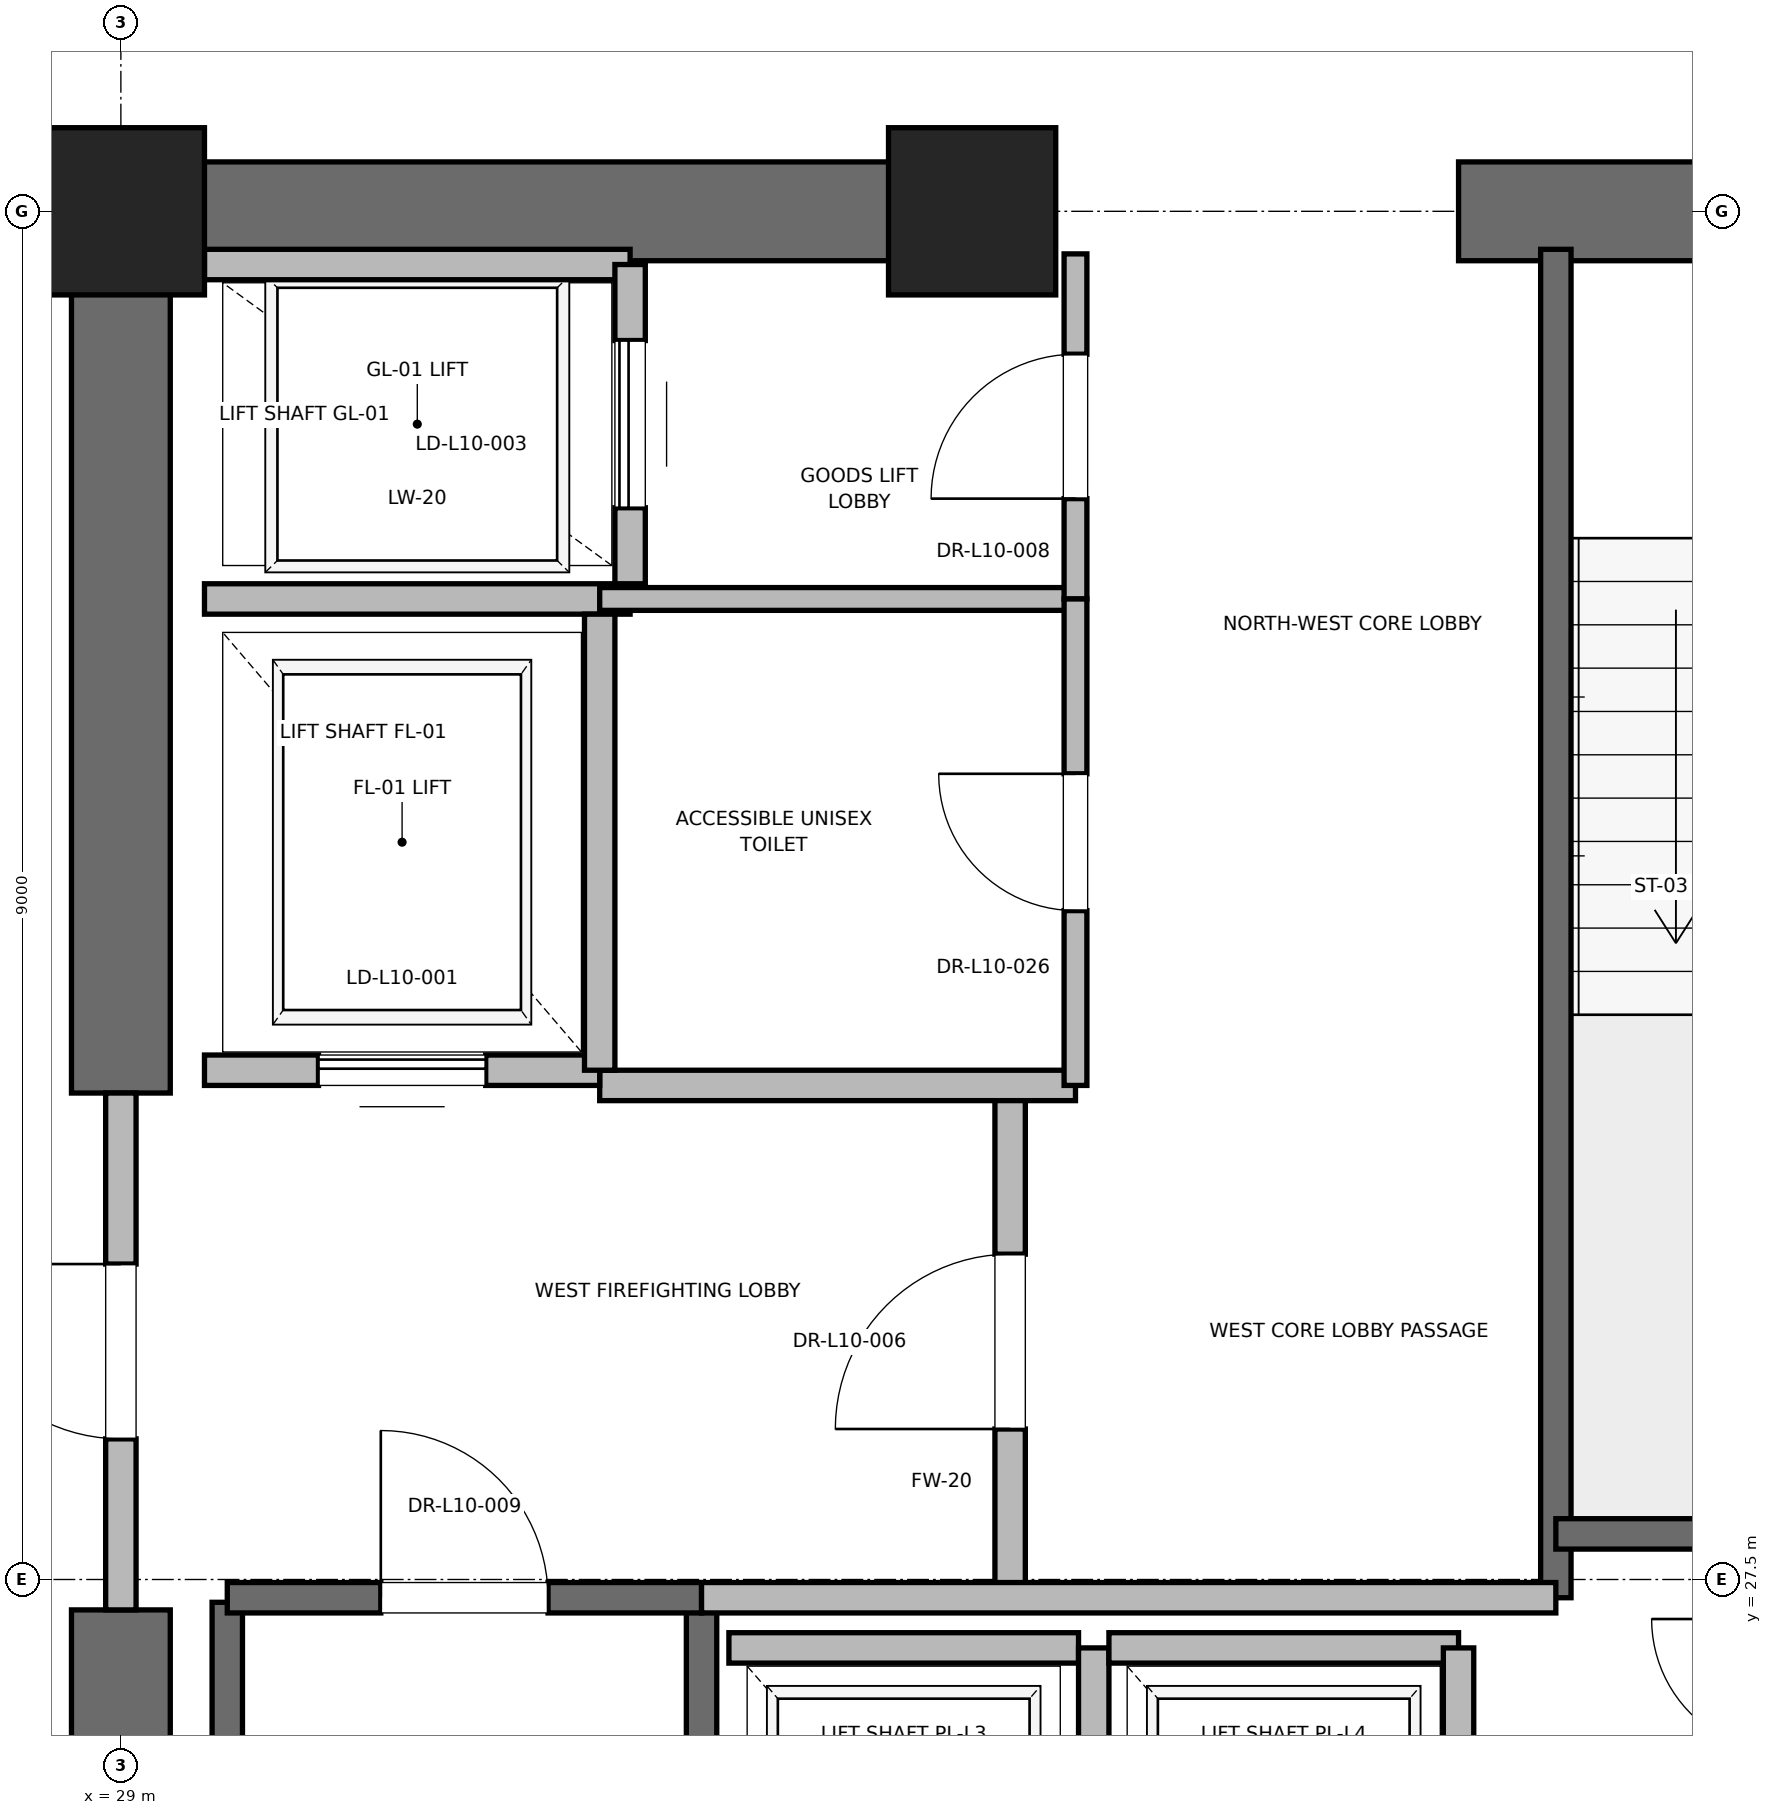
"""IFC4 building model, lengths in metres.
Left out: names, types, materials, properties, quantities, classifications, styles, units other than length and angle.
Written with IfcOpenShell. Run it as: python <this file> out.ifc"""

import sys

from ifc_helpers import new_model, si_unit, direction, frame, frame_2d, origin, origin_2d, place, context, subcontext, project, spatial, rectangle, extrude, element, fill, save


model = new_model("IFC4")
c1 = context("Model", 3, precision=1e-05, world=origin(), true_north=direction((0.0, 1.0)))
c2 = subcontext(c1, "Body", "Model", "MODEL_VIEW")
j1 = project(units=[si_unit("LENGTHUNIT", "METRE"), si_unit("PLANEANGLEUNIT", "RADIAN")], contexts=[c1])
p1 = place(None, origin())
s1 = spatial("IfcSite", under=j1, at=p1, CompositionType="ELEMENT")
p2 = place(p1, origin())
s2 = spatial("IfcBuilding", under=s1, at=p2, CompositionType="ELEMENT")
p3 = place(p2, frame((0.0, 0.0, 47.6)))
s3 = spatial("IfcBuildingStorey", under=s2, at=p3, CompositionType="ELEMENT", Elevation=47.6)
for number, where, z_axis, x_axis in (
    (1, (29.0, 36.5, 0.0), (0.0, 0.0, 1.0), (1.0, 0.0, 0.0)),
    (2, (34.6, 36.5, 0.0), (0.0, 0.0, 1.0), (1.0, 0.0, 0.0)),
):
    element("IfcColumn", number, at=place(p3, frame(where, z_axis=z_axis, x_axis=x_axis)), inside=s3, PredefinedType="PILASTER", context=c2, shape_type="SweptSolid", body=[
        extrude(rectangle(XDim=1.1, YDim=1.1, at=origin_2d()), origin(), (0.0, 0.0, 1.0), 4.0),
    ])
p4 = place(p3, frame((29.0, 36.5, 0.0), z_axis=(0.0, 0.0, 1.0), x_axis=(1.0, 0.0, 0.0)))
e3 = element("IfcWall", 3, at=p4, inside=s3, PredefinedType="SHEAR", context=c2, shape_type="SweptSolid", body=[
    extrude(rectangle(XDim=5.8, YDim=0.65, at=frame_2d((2.9, 0.0))), origin(), (0.0, 0.0, 1.0), 3.76),
])
p5 = place(p3, frame((37.8, 36.5, 0.0), z_axis=(0.0, 0.0, 1.0), x_axis=(1.0, 0.0, 0.0)))
e4 = element("IfcWall", 4, at=p5, inside=s3, PredefinedType="SHEAR", context=c2, shape_type="SweptSolid", body=[
    extrude(rectangle(XDim=4.4, YDim=0.65, at=frame_2d((2.2, 0.0))), origin(), (0.0, 0.0, 1.0), 3.76),
])
p6 = place(p5, frame((1.65, 0.0, 0.0)))
e5 = element("IfcOpeningElement", 5, at=p6, cuts=e4, PredefinedType="OPENING", context=c2, shape_type="SweptSolid", body=[
    extrude(rectangle(XDim=1.1, YDim=2.15, at=frame_2d((0.55, 1.075))), frame((0.0, 0.325, 0.0), z_axis=(0.0, -1.0, 0.0), x_axis=(1.0, 0.0, 0.0)), (0.0, 0.0, 1.0), 0.65),
])
p7 = place(p3, frame((29.0, 18.5, 0.0), z_axis=(0.0, 0.0, 1.0), x_axis=(0.0, 1.0, 0.0)))
e6 = element("IfcWall", 6, at=p7, inside=s3, PredefinedType="SHEAR", context=c2, shape_type="SweptSolid", body=[
    extrude(rectangle(XDim=8.8, YDim=0.65, at=frame_2d((4.4, 0.0))), origin(), (0.0, 0.0, 1.0), 3.76),
])
p8 = place(p3, frame((29.0, 30.7, 0.0), z_axis=(0.0, 0.0, 1.0), x_axis=(0.0, 1.0, 0.0)))
e7 = element("IfcWall", 7, at=p8, inside=s3, PredefinedType="SHEAR", context=c2, shape_type="SweptSolid", body=[
    extrude(rectangle(XDim=5.8, YDim=0.65, at=frame_2d((2.9, 0.0))), origin(), (0.0, 0.0, 1.0), 3.76),
])
p9 = place(p3, frame((29.7, 19.2, 0.0), z_axis=(0.0, 0.0, 1.0), x_axis=(0.0, 1.0, 0.0)))
e8 = element("IfcWall", 8, at=p9, inside=s3, PredefinedType="SOLIDWALL", context=c2, shape_type="SweptSolid", body=[
    extrude(rectangle(XDim=8.15, YDim=0.2, at=frame_2d((4.075, 0.0))), origin(), (0.0, 0.0, 1.0), 3.76),
])
p10 = place(p3, frame((32.82, 18.6, 0.0), z_axis=(0.0, 0.0, 1.0), x_axis=(0.0, 1.0, 0.0)))
e9 = element("IfcWall", 9, at=p10, inside=s3, PredefinedType="SOLIDWALL", context=c2, shape_type="SweptSolid", body=[
    extrude(rectangle(XDim=8.78, YDim=0.2, at=frame_2d((4.39, 0.0))), origin(), (0.0, 0.0, 1.0), 3.76),
])
p11 = place(p3, frame((29.7, 27.38, 0.0), z_axis=(0.0, 0.0, 1.0), x_axis=(1.0, 0.0, 0.0)))
e10 = element("IfcWall", 10, at=p11, inside=s3, PredefinedType="SOLIDWALL", context=c2, shape_type="SweptSolid", body=[
    extrude(rectangle(XDim=3.12, YDim=0.2, at=frame_2d((1.56, 0.0))), origin(), (0.0, 0.0, 1.0), 3.76),
])
p12 = place(p11, frame((1.01, 0.0, 0.0)))
e11 = element("IfcOpeningElement", 11, at=p12, cuts=e10, PredefinedType="OPENING", context=c2, shape_type="SweptSolid", body=[
    extrude(rectangle(XDim=1.1, YDim=2.15, at=frame_2d((0.55, 1.075))), frame((0.0, 0.1, 0.0), z_axis=(0.0, -1.0, 0.0), x_axis=(1.0, 0.0, 0.0)), (0.0, 0.0, 1.0), 0.2),
])
p13 = place(p3, frame((38.44, 27.38, 0.0), z_axis=(0.0, 0.0, 1.0), x_axis=(0.0, 1.0, 0.0)))
e12 = element("IfcWall", 12, at=p13, inside=s3, PredefinedType="SOLIDWALL", context=c2, shape_type="SweptSolid", body=[
    extrude(rectangle(XDim=8.87, YDim=0.2, at=frame_2d((4.435, 0.0))), origin(), (0.0, 0.0, 1.0), 3.76),
])
p14 = place(p3, frame((38.44, 27.8, 0.0), z_axis=(0.0, 0.0, 1.0), x_axis=(1.0, 0.0, 0.0)))
e13 = element("IfcWall", 13, at=p14, inside=s3, PredefinedType="SOLIDWALL", context=c2, shape_type="SweptSolid", body=[
    extrude(rectangle(XDim=3.32, YDim=0.2, at=frame_2d((1.66, 0.0))), origin(), (0.0, 0.0, 1.0), 3.76),
])
p15 = place(p3, frame((34.85, 27.38, 0.0), z_axis=(0.0, 0.0, 1.0), x_axis=(0.0, 1.0, 0.0)))
e14 = element("IfcWall", 14, at=p15, inside=s3, PredefinedType="PARTITIONING", context=c2, shape_type="SweptSolid", body=[
    extrude(rectangle(XDim=3.37, YDim=0.2, at=frame_2d((1.685, 0.0))), origin(), (0.0, 0.0, 1.0), 3.76),
])
p16 = place(p15, frame((1.11, 0.0, 0.0)))
e15 = element("IfcOpeningElement", 15, at=p16, cuts=e14, PredefinedType="OPENING", context=c2, shape_type="SweptSolid", body=[
    extrude(rectangle(XDim=1.15, YDim=2.2, at=frame_2d((0.575, 1.1))), frame((0.0, 0.1, 0.0), z_axis=(0.0, -1.0, 0.0), x_axis=(1.0, 0.0, 0.0)), (0.0, 0.0, 1.0), 0.2),
])
p17 = place(p3, frame((29.0, 27.3, 0.0), z_axis=(0.0, 0.0, 1.0), x_axis=(0.0, 1.0, 0.0)))
e16 = element("IfcWall", 16, at=p17, inside=s3, PredefinedType="PARTITIONING", context=c2, shape_type="SweptSolid", body=[
    extrude(rectangle(XDim=3.4, YDim=0.2, at=frame_2d((1.7, 0.0))), origin(), (0.0, 0.0, 1.0), 2.54),
])
p18 = place(p17, frame((1.125, 0.0, 0.0)))
e17 = element("IfcOpeningElement", 17, at=p18, cuts=e16, PredefinedType="OPENING", context=c2, shape_type="SweptSolid", body=[
    extrude(rectangle(XDim=1.15, YDim=2.2, at=frame_2d((0.575, 1.1))), frame((0.0, 0.1, 0.0), z_axis=(0.0, -1.0, 0.0), x_axis=(1.0, 0.0, 0.0)), (0.0, 0.0, 1.0), 0.2),
])
p19 = place(p3, frame((32.82, 27.38, 0.0), z_axis=(0.0, 0.0, 1.0), x_axis=(1.0, 0.0, 0.0)))
e18 = element("IfcWall", 18, at=p19, inside=s3, PredefinedType="PARTITIONING", context=c2, shape_type="SweptSolid", body=[
    extrude(rectangle(XDim=5.62, YDim=0.2, at=frame_2d((2.81, 0.0))), origin(), (0.0, 0.0, 1.0), 3.76),
])
p20 = place(p3, frame((32.15, 30.75, 0.0), z_axis=(0.0, 0.0, 1.0), x_axis=(1.0, 0.0, 0.0)))
e19 = element("IfcWall", 19, at=p20, inside=s3, PredefinedType="PARTITIONING", context=c2, shape_type="SweptSolid", body=[
    extrude(rectangle(XDim=3.13, YDim=0.2, at=frame_2d((1.565, 0.0))), origin(), (0.0, 0.0, 1.0), 3.76),
])
p21 = place(p3, frame((29.55, 30.85, 0.0), z_axis=(0.0, 0.0, 1.0), x_axis=(1.0, 0.0, 0.0)))
e20 = element("IfcWall", 20, at=p21, inside=s3, PredefinedType="SOLIDWALL", context=c2, shape_type="SweptSolid", body=[
    extrude(rectangle(XDim=2.6, YDim=0.2, at=frame_2d((1.3, 0.0))), origin(), (0.0, 0.0, 1.0), 2.54),
])
p22 = place(p21, frame((0.75, 0.0, 0.0)))
e21 = element("IfcOpeningElement", 21, at=p22, cuts=e20, PredefinedType="OPENING", context=c2, shape_type="SweptSolid", body=[
    extrude(rectangle(XDim=1.1, YDim=2.2, at=frame_2d((0.55, 1.1))), frame((0.0, 0.1, 0.0), z_axis=(0.0, -1.0, 0.0), x_axis=(1.0, 0.0, 0.0)), (0.0, 0.0, 1.0), 0.2),
])
p23 = place(p3, frame((29.55, 33.95, 0.0), z_axis=(0.0, 0.0, 1.0), x_axis=(1.0, 0.0, 0.0)))
e22 = element("IfcWall", 22, at=p23, inside=s3, PredefinedType="SOLIDWALL", context=c2, shape_type="SweptSolid", body=[
    extrude(rectangle(XDim=2.8, YDim=0.2, at=frame_2d((1.4, 0.0))), origin(), (0.0, 0.0, 1.0), 3.76),
])
p24 = place(p3, frame((32.15, 30.85, 0.0), z_axis=(0.0, 0.0, 1.0), x_axis=(0.0, 1.0, 0.0)))
e23 = element("IfcWall", 23, at=p24, inside=s3, PredefinedType="SOLIDWALL", context=c2, shape_type="SweptSolid", body=[
    extrude(rectangle(XDim=3.0, YDim=0.2, at=frame_2d((1.5, 0.0))), origin(), (0.0, 0.0, 1.0), 3.76),
])
p25 = place(p3, frame((32.35, 36.15, 0.0), z_axis=(0.0, 0.0, 1.0), x_axis=(-1.0, 0.0, 0.0)))
e24 = element("IfcWall", 24, at=p25, inside=s3, PredefinedType="SOLIDWALL", context=c2, shape_type="SweptSolid", body=[
    extrude(rectangle(XDim=2.8, YDim=0.2, at=frame_2d((1.4, 0.0))), origin(), (0.0, 0.0, 1.0), 2.889),
])
p26 = place(p3, frame((32.35, 34.05, 0.0), z_axis=(0.0, 0.0, 1.0), x_axis=(0.0, 1.0, 0.0)))
e25 = element("IfcWall", 25, at=p26, inside=s3, PredefinedType="SOLIDWALL", context=c2, shape_type="SweptSolid", body=[
    extrude(rectangle(XDim=2.1, YDim=0.2, at=frame_2d((1.05, 0.0))), origin(), (0.0, 0.0, 1.0), 3.76),
])
p27 = place(p26, frame((0.5, 0.0, 0.0)))
e26 = element("IfcOpeningElement", 26, at=p27, cuts=e25, PredefinedType="OPENING", context=c2, shape_type="SweptSolid", body=[
    extrude(rectangle(XDim=1.1, YDim=2.2, at=frame_2d((0.55, 1.1))), frame((0.0, 0.1, 0.0), z_axis=(0.0, -1.0, 0.0), x_axis=(1.0, 0.0, 0.0)), (0.0, 0.0, 1.0), 0.2),
])
p28 = place(p3, frame((35.3, 27.05, 0.0), z_axis=(0.0, 0.0, 1.0), x_axis=(-1.0, 0.0, 0.0)))
e27 = element("IfcWall", 27, at=p28, inside=s3, PredefinedType="SOLIDWALL", context=c2, shape_type="SweptSolid", body=[
    extrude(rectangle(XDim=2.3, YDim=0.2, at=frame_2d((1.15, 0.0))), origin(), (0.0, 0.0, 1.0), 3.76),
])
p29 = place(p3, frame((35.4, 24.45, 0.0), z_axis=(0.0, 0.0, 1.0), x_axis=(0.0, 1.0, 0.0)))
e28 = element("IfcWall", 28, at=p29, inside=s3, PredefinedType="SOLIDWALL", context=c2, shape_type="SweptSolid", body=[
    extrude(rectangle(XDim=2.6, YDim=0.2, at=frame_2d((1.3, 0.0))), origin(), (0.0, 0.0, 1.0), 3.76),
])
p30 = place(p3, frame((37.8, 27.05, 0.0), z_axis=(0.0, 0.0, 1.0), x_axis=(-1.0, 0.0, 0.0)))
e29 = element("IfcWall", 29, at=p30, inside=s3, PredefinedType="SOLIDWALL", context=c2, shape_type="SweptSolid", body=[
    extrude(rectangle(XDim=2.3, YDim=0.2, at=frame_2d((1.15, 0.0))), origin(), (0.0, 0.0, 1.0), 3.76),
])
p31 = place(p3, frame((37.8, 24.45, 0.0), z_axis=(0.0, 0.0, 1.0), x_axis=(0.0, 1.0, 0.0)))
e30 = element("IfcWall", 30, at=p31, inside=s3, PredefinedType="SOLIDWALL", context=c2, shape_type="SweptSolid", body=[
    extrude(rectangle(XDim=2.6, YDim=0.2, at=frame_2d((1.3, 0.0))), origin(), (0.0, 0.0, 1.0), 3.76),
])
p32 = place(p3, frame((32.15, 33.95, 0.0), z_axis=(0.0, 0.0, 1.0), x_axis=(1.0, 0.0, 0.0)))
e31 = element("IfcWall", 31, at=p32, inside=s3, PredefinedType="PARTITIONING", context=c2, shape_type="SweptSolid", body=[
    extrude(rectangle(XDim=3.13, YDim=0.15, at=frame_2d((1.565, 0.0))), origin(), (0.0, 0.0, 1.0), 2.85),
])
p33 = place(p3, frame((35.28, 33.95, 0.0), z_axis=(0.0, 0.0, 1.0), x_axis=(0.0, 1.0, 0.0)))
e32 = element("IfcWall", 32, at=p33, inside=s3, PredefinedType="PARTITIONING", context=c2, shape_type="SweptSolid", body=[
    extrude(rectangle(XDim=2.27, YDim=0.15, at=frame_2d((1.135, 0.0))), origin(), (0.0, 0.0, 1.0), 2.54),
])
p34 = place(p33, frame((0.66, 0.0, 0.0)))
e33 = element("IfcOpeningElement", 33, at=p34, cuts=e32, PredefinedType="OPENING", context=c2, shape_type="SweptSolid", body=[
    extrude(rectangle(XDim=0.95, YDim=2.15, at=frame_2d((0.475, 1.075))), frame((0.0, 0.075, 0.0), z_axis=(0.0, -1.0, 0.0), x_axis=(1.0, 0.0, 0.0)), (0.0, 0.0, 1.0), 0.15),
])
p35 = place(p3, frame((35.28, 30.75, 0.0), z_axis=(0.0, 0.0, 1.0), x_axis=(0.0, 1.0, 0.0)))
e34 = element("IfcWall", 34, at=p35, inside=s3, PredefinedType="PARTITIONING", context=c2, shape_type="SweptSolid", body=[
    extrude(rectangle(XDim=3.2, YDim=0.15, at=frame_2d((1.6, 0.0))), origin(), (0.0, 0.0, 1.0), 2.85),
])
p36 = place(p35, frame((1.15, 0.0, 0.0)))
e35 = element("IfcOpeningElement", 35, at=p36, cuts=e34, PredefinedType="OPENING", context=c2, shape_type="SweptSolid", body=[
    extrude(rectangle(XDim=0.9, YDim=2.1, at=frame_2d((0.45, 1.05))), frame((0.0, 0.075, 0.0), z_axis=(0.0, -1.0, 0.0), x_axis=(1.0, 0.0, 0.0)), (0.0, 0.0, 1.0), 0.15),
])
p37 = place(p12, origin())
e36 = element("IfcDoor", 36, at=p37, inside=s3, OperationType="SINGLE_SWING_LEFT", PredefinedType="DOOR", context=c2, shape_type="SweptSolid", body=[
    extrude(rectangle(XDim=1.1, YDim=2.15, at=frame_2d((0.55, 1.075))), frame((0.0, 0.025, 0.0), z_axis=(0.0, -1.0, 0.0), x_axis=(1.0, 0.0, 0.0)), (0.0, 0.0, 1.0), 0.05),
])
fill(e11, e36)
p38 = place(p16, origin())
e37 = element("IfcDoor", 37, at=p38, inside=s3, OperationType="SINGLE_SWING_LEFT", PredefinedType="DOOR", context=c2, shape_type="SweptSolid", body=[
    extrude(rectangle(XDim=1.15, YDim=2.2, at=frame_2d((0.575, 1.1))), frame((0.0, 0.025, 0.0), z_axis=(0.0, -1.0, 0.0), x_axis=(1.0, 0.0, 0.0)), (0.0, 0.0, 1.0), 0.05),
])
fill(e15, e37)
p39 = place(p18, origin())
e38 = element("IfcDoor", 38, at=p39, inside=s3, OperationType="SINGLE_SWING_RIGHT", PredefinedType="DOOR", context=c2, shape_type="SweptSolid", body=[
    extrude(rectangle(XDim=1.15, YDim=2.2, at=frame_2d((0.575, 1.1))), frame((0.0, 0.025, 0.0), z_axis=(0.0, -1.0, 0.0), x_axis=(1.0, 0.0, 0.0)), (0.0, 0.0, 1.0), 0.05),
])
fill(e17, e38)
p40 = place(p22, origin())
e39 = element("IfcDoor", 39, at=p40, inside=s3, OperationType="SLIDING_TO_RIGHT", PredefinedType="DOOR", context=c2, shape_type="SweptSolid", body=[
    extrude(rectangle(XDim=1.1, YDim=2.2, at=frame_2d((0.55, 1.1))), frame((0.0, 0.025, 0.0), z_axis=(0.0, -1.0, 0.0), x_axis=(1.0, 0.0, 0.0)), (0.0, 0.0, 1.0), 0.05),
])
fill(e21, e39)
p41 = place(p27, origin())
e40 = element("IfcDoor", 40, at=p41, inside=s3, OperationType="SLIDING_TO_RIGHT", PredefinedType="DOOR", context=c2, shape_type="SweptSolid", body=[
    extrude(rectangle(XDim=1.1, YDim=2.2, at=frame_2d((0.55, 1.1))), frame((0.0, 0.025, 0.0), z_axis=(0.0, -1.0, 0.0), x_axis=(1.0, 0.0, 0.0)), (0.0, 0.0, 1.0), 0.05),
])
fill(e26, e40)
p42 = place(p34, origin())
e41 = element("IfcDoor", 41, at=p42, inside=s3, OperationType="SINGLE_SWING_LEFT", PredefinedType="DOOR", context=c2, shape_type="SweptSolid", body=[
    extrude(rectangle(XDim=0.95, YDim=2.15, at=frame_2d((0.475, 1.075))), frame((0.0, 0.025, 0.0), z_axis=(0.0, -1.0, 0.0), x_axis=(1.0, 0.0, 0.0)), (0.0, 0.0, 1.0), 0.05),
])
fill(e33, e41)
p43 = place(p36, origin())
e42 = element("IfcDoor", 42, at=p43, inside=s3, OperationType="SINGLE_SWING_RIGHT", PredefinedType="DOOR", context=c2, shape_type="SweptSolid", body=[
    extrude(rectangle(XDim=0.9, YDim=2.1, at=frame_2d((0.45, 1.05))), frame((0.0, 0.025, 0.0), z_axis=(0.0, -1.0, 0.0), x_axis=(1.0, 0.0, 0.0)), (0.0, 0.0, 1.0), 0.05),
])
fill(e35, e42)
save(model, sys.argv[1])
